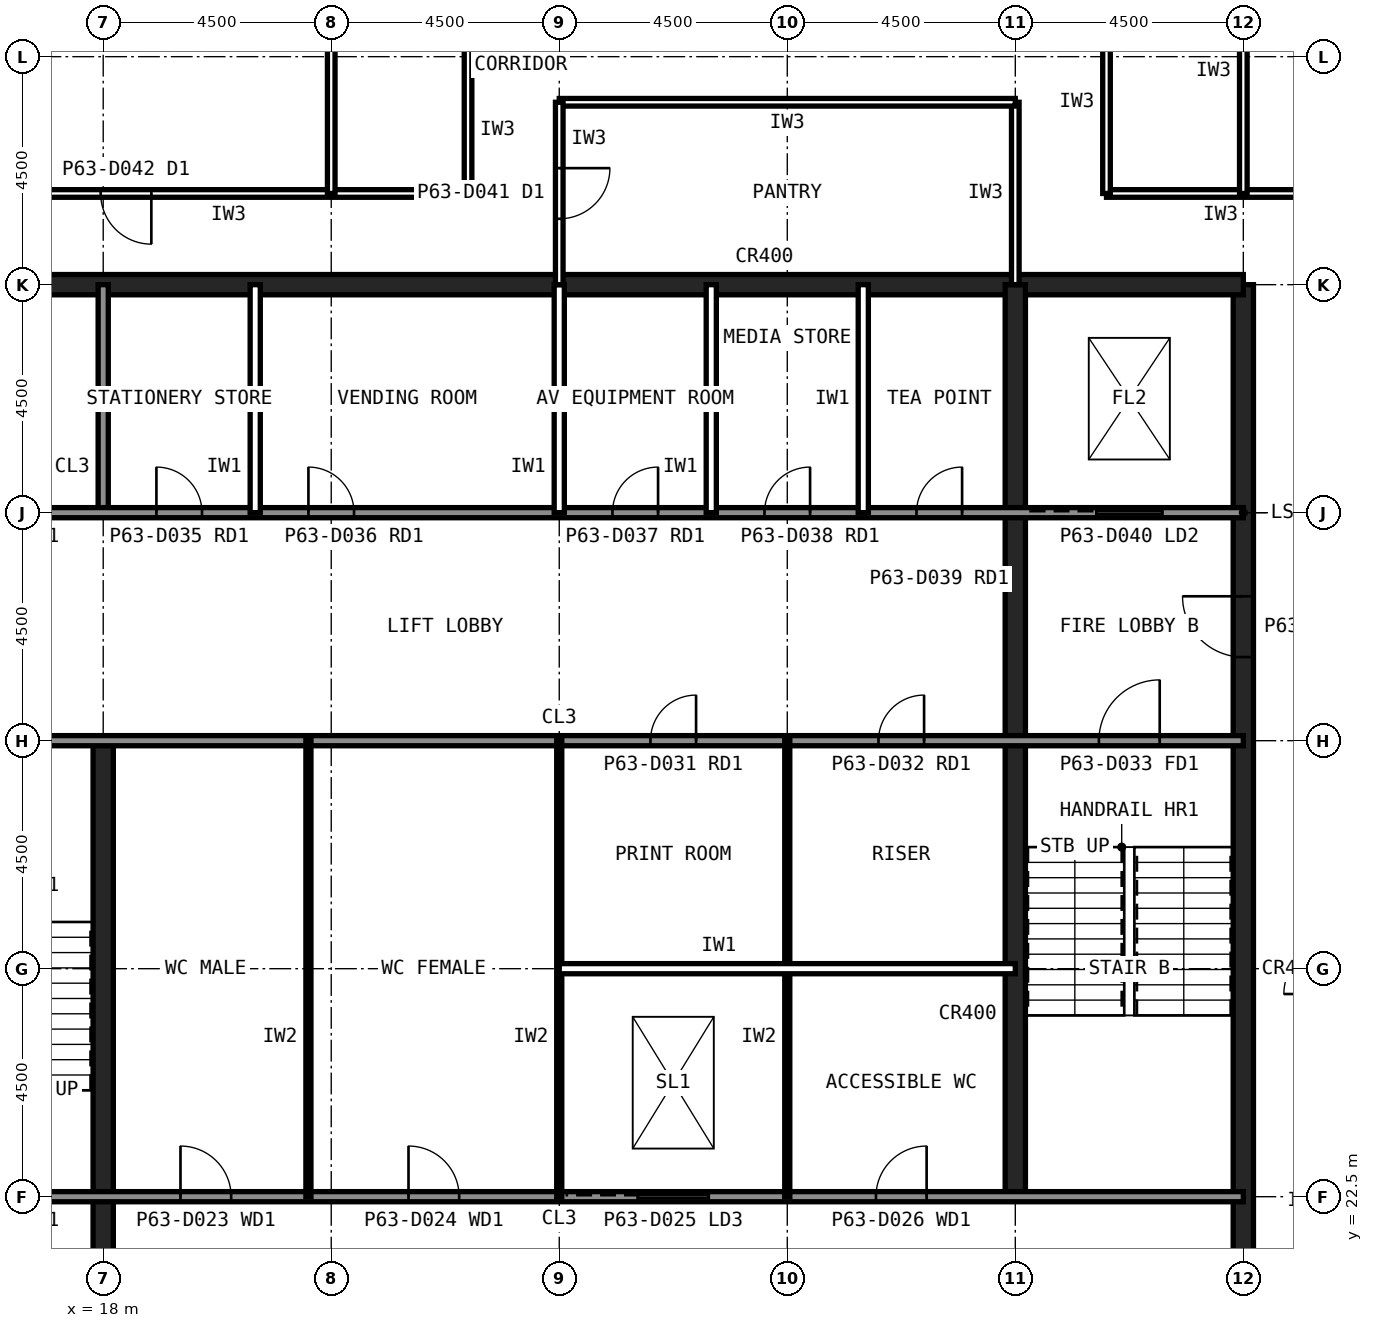
"""IFC4 building model, lengths in metres.
Left out: names, types, materials, properties, quantities, classifications, styles, units other than length and angle.
Written with IfcOpenShell. Run it as: python <this file> out.ifc"""

import sys

from ifc_helpers import new_model, si_unit, direction, frame, frame_2d, origin, place, context, subcontext, project, spatial, rectangle, extrude, element, fill, save


model = new_model("IFC4")
c1 = context("Model", 3, precision=1e-05, world=origin(), true_north=direction((0.0, 1.0)))
c2 = subcontext(c1, "Body", "Model", "MODEL_VIEW")
j1 = project(units=[si_unit("LENGTHUNIT", "METRE"), si_unit("PLANEANGLEUNIT", "RADIAN")], contexts=[c1])
p1 = place(None, origin())
s1 = spatial("IfcSite", under=j1, at=p1, CompositionType="ELEMENT")
p2 = place(p1, origin())
s2 = spatial("IfcBuilding", under=s1, at=p2, CompositionType="ELEMENT")
p3 = place(p2, frame((0.0, 0.0, 262.6)))
s3 = spatial("IfcBuildingStorey", under=s2, at=p3, CompositionType="ELEMENT", Elevation=262.6)
p4 = place(p3, frame((40.5, 13.5, 0.0), z_axis=(0.0, 0.0, 1.0), x_axis=(0.0, 1.0, 0.0)))
e1 = element("IfcWall", 1, at=p4, inside=s3, PredefinedType="SHEAR", context=c2, shape_type="SweptSolid", body=[
    extrude(rectangle(XDim=27.0, YDim=0.4, at=frame_2d((13.5, 0.0))), origin(), (0.0, 0.0, 1.0), 4.0),
])
p5 = place(p4, frame((5.85, 0.0, 0.0)))
e2 = element("IfcOpeningElement", 2, at=p5, cuts=e1, PredefinedType="OPENING", context=c2, shape_type="SweptSolid", body=[
    extrude(rectangle(XDim=1.8, YDim=2.1, at=frame_2d((0.9, 1.05))), frame((0.0, 0.21, 0.0), z_axis=(0.0, -1.0, 0.0), x_axis=(1.0, 0.0, 0.0)), (0.0, 0.0, 1.0), 0.42),
])
p6 = place(p4, frame((19.65, 0.0, 0.0)))
e3 = element("IfcOpeningElement", 3, at=p6, cuts=e1, PredefinedType="OPENING", context=c2, shape_type="SweptSolid", body=[
    extrude(rectangle(XDim=1.2, YDim=2.1, at=frame_2d((0.6, 1.05))), frame((0.0, 0.21, 0.0), z_axis=(0.0, -1.0, 0.0), x_axis=(1.0, 0.0, 0.0)), (0.0, 0.0, 1.0), 0.42),
])
p7 = place(p3, frame((40.5, 40.5, 0.0), z_axis=(0.0, 0.0, 1.0), x_axis=(-1.0, 0.0, 0.0)))
e4 = element("IfcWall", 4, at=p7, inside=s3, PredefinedType="SHEAR", context=c2, shape_type="SweptSolid", body=[
    extrude(rectangle(XDim=27.0, YDim=0.4, at=frame_2d((13.5, 0.0))), origin(), (0.0, 0.0, 1.0), 4.0),
])
p8 = place(p3, frame((18.0, 13.5, 0.0), z_axis=(0.0, 0.0, 1.0), x_axis=(0.0, 1.0, 0.0)))
e5 = element("IfcWall", 5, at=p8, inside=s3, PredefinedType="SHEAR", context=c2, shape_type="SweptSolid", body=[
    extrude(rectangle(XDim=18.0, YDim=0.4, at=frame_2d((9.0, 0.0))), origin(), (0.0, 0.0, 1.0), 4.0),
])
p9 = place(p3, frame((18.0, 36.0, 0.0), z_axis=(0.0, 0.0, 1.0), x_axis=(0.0, 1.0, 0.0)))
e6 = element("IfcWall", 6, at=p9, inside=s3, PredefinedType="SOLIDWALL", context=c2, shape_type="SweptSolid", body=[
    extrude(rectangle(XDim=4.5, YDim=0.2, at=frame_2d((2.25, 0.0))), origin(), (0.0, 0.0, 1.0), 3.84),
])
p10 = place(p3, frame((36.0, 22.5, 0.0), z_axis=(0.0, 0.0, 1.0), x_axis=(0.0, 1.0, 0.0)))
e7 = element("IfcWall", 7, at=p10, inside=s3, PredefinedType="SHEAR", context=c2, shape_type="SweptSolid", body=[
    extrude(rectangle(XDim=18.0, YDim=0.4, at=frame_2d((9.0, 0.0))), origin(), (0.0, 0.0, 1.0), 4.0),
])
p11 = place(p3, frame((13.5, 36.0, 0.0), z_axis=(0.0, 0.0, 1.0), x_axis=(1.0, 0.0, 0.0)))
e8 = element("IfcWall", 8, at=p11, inside=s3, PredefinedType="SOLIDWALL", context=c2, shape_type="SweptSolid", body=[
    extrude(rectangle(XDim=27.0, YDim=0.2, at=frame_2d((13.5, 0.0))), origin(), (0.0, 0.0, 1.0), 3.84),
])
p12 = place(p11, frame((1.8, 0.0, 0.0)))
e9 = element("IfcOpeningElement", 9, at=p12, cuts=e8, PredefinedType="OPENING", context=c2, shape_type="SweptSolid", body=[
    extrude(rectangle(XDim=0.9, YDim=2.1, at=frame_2d((0.45, 1.05))), frame((0.0, 0.11, 0.0), z_axis=(0.0, -1.0, 0.0), x_axis=(1.0, 0.0, 0.0)), (0.0, 0.0, 1.0), 0.22),
])
p13 = place(p11, frame((5.55, 0.0, 0.0)))
e10 = element("IfcOpeningElement", 10, at=p13, cuts=e8, PredefinedType="OPENING", context=c2, shape_type="SweptSolid", body=[
    extrude(rectangle(XDim=0.9, YDim=2.1, at=frame_2d((0.45, 1.05))), frame((0.0, 0.11, 0.0), z_axis=(0.0, -1.0, 0.0), x_axis=(1.0, 0.0, 0.0)), (0.0, 0.0, 1.0), 0.22),
])
p14 = place(p11, frame((11.55, 0.0, 0.0)))
e11 = element("IfcOpeningElement", 11, at=p14, cuts=e8, PredefinedType="OPENING", context=c2, shape_type="SweptSolid", body=[
    extrude(rectangle(XDim=0.9, YDim=2.1, at=frame_2d((0.45, 1.05))), frame((0.0, 0.11, 0.0), z_axis=(0.0, -1.0, 0.0), x_axis=(1.0, 0.0, 0.0)), (0.0, 0.0, 1.0), 0.22),
])
p15 = place(p11, frame((14.55, 0.0, 0.0)))
e12 = element("IfcOpeningElement", 12, at=p15, cuts=e8, PredefinedType="OPENING", context=c2, shape_type="SweptSolid", body=[
    extrude(rectangle(XDim=0.9, YDim=2.1, at=frame_2d((0.45, 1.05))), frame((0.0, 0.11, 0.0), z_axis=(0.0, -1.0, 0.0), x_axis=(1.0, 0.0, 0.0)), (0.0, 0.0, 1.0), 0.22),
])
p16 = place(p11, frame((24.1, 0.0, 0.0)))
e13 = element("IfcOpeningElement", 13, at=p16, cuts=e8, PredefinedType="OPENING", context=c2, shape_type="SweptSolid", body=[
    extrude(rectangle(XDim=1.3, YDim=2.2, at=frame_2d((0.65, 1.1))), frame((0.0, 0.11, 0.0), z_axis=(0.0, -1.0, 0.0), x_axis=(1.0, 0.0, 0.0)), (0.0, 0.0, 1.0), 0.22),
])
p17 = place(p3, frame((13.5, 22.5, 0.0), z_axis=(0.0, 0.0, 1.0), x_axis=(1.0, 0.0, 0.0)))
e14 = element("IfcWall", 14, at=p17, inside=s3, PredefinedType="SOLIDWALL", context=c2, shape_type="SweptSolid", body=[
    extrude(rectangle(XDim=27.0, YDim=0.2, at=frame_2d((13.5, 0.0))), origin(), (0.0, 0.0, 1.0), 3.84),
])
p18 = place(p17, frame((1.65, 0.0, 0.0)))
e15 = element("IfcOpeningElement", 15, at=p18, cuts=e14, PredefinedType="OPENING", context=c2, shape_type="SweptSolid", body=[
    extrude(rectangle(XDim=1.2, YDim=2.1, at=frame_2d((0.6, 1.05))), frame((0.0, 0.11, 0.0), z_axis=(0.0, -1.0, 0.0), x_axis=(1.0, 0.0, 0.0)), (0.0, 0.0, 1.0), 0.22),
])
p19 = place(p17, frame((6.025, 0.0, 0.0)))
e16 = element("IfcOpeningElement", 16, at=p19, cuts=e14, PredefinedType="OPENING", context=c2, shape_type="SweptSolid", body=[
    extrude(rectangle(XDim=1.0, YDim=2.1, at=frame_2d((0.5, 1.05))), frame((0.0, 0.11, 0.0), z_axis=(0.0, -1.0, 0.0), x_axis=(1.0, 0.0, 0.0)), (0.0, 0.0, 1.0), 0.22),
])
p20 = place(p17, frame((10.525, 0.0, 0.0)))
e17 = element("IfcOpeningElement", 17, at=p20, cuts=e14, PredefinedType="OPENING", context=c2, shape_type="SweptSolid", body=[
    extrude(rectangle(XDim=1.0, YDim=2.1, at=frame_2d((0.5, 1.05))), frame((0.0, 0.11, 0.0), z_axis=(0.0, -1.0, 0.0), x_axis=(1.0, 0.0, 0.0)), (0.0, 0.0, 1.0), 0.22),
])
p21 = place(p17, frame((19.75, 0.0, 0.0)))
e18 = element("IfcOpeningElement", 18, at=p21, cuts=e14, PredefinedType="OPENING", context=c2, shape_type="SweptSolid", body=[
    extrude(rectangle(XDim=1.0, YDim=2.1, at=frame_2d((0.5, 1.05))), frame((0.0, 0.11, 0.0), z_axis=(0.0, -1.0, 0.0), x_axis=(1.0, 0.0, 0.0)), (0.0, 0.0, 1.0), 0.22),
])
p22 = place(p17, frame((15.05, 0.0, 0.0)))
e19 = element("IfcOpeningElement", 19, at=p22, cuts=e14, PredefinedType="OPENING", context=c2, shape_type="SweptSolid", body=[
    extrude(rectangle(XDim=1.4, YDim=2.4, at=frame_2d((0.7, 1.2))), frame((0.0, 0.11, 0.0), z_axis=(0.0, -1.0, 0.0), x_axis=(1.0, 0.0, 0.0)), (0.0, 0.0, 1.0), 0.22),
])
p23 = place(p3, frame((13.5, 31.5, 0.0), z_axis=(0.0, 0.0, 1.0), x_axis=(1.0, 0.0, 0.0)))
e20 = element("IfcWall", 20, at=p23, inside=s3, PredefinedType="SOLIDWALL", context=c2, shape_type="SweptSolid", body=[
    extrude(rectangle(XDim=27.0, YDim=0.2, at=frame_2d((13.5, 0.0))), origin(), (0.0, 0.0, 1.0), 3.84),
])
p24 = place(p23, frame((24.15, 0.0, 0.0)))
e21 = element("IfcOpeningElement", 21, at=p24, cuts=e20, PredefinedType="OPENING", context=c2, shape_type="SweptSolid", body=[
    extrude(rectangle(XDim=1.2, YDim=2.1, at=frame_2d((0.6, 1.05))), frame((0.0, 0.11, 0.0), z_axis=(0.0, -1.0, 0.0), x_axis=(1.0, 0.0, 0.0)), (0.0, 0.0, 1.0), 0.22),
])
p25 = place(p23, frame((15.3, 0.0, 0.0)))
e22 = element("IfcOpeningElement", 22, at=p25, cuts=e20, PredefinedType="OPENING", context=c2, shape_type="SweptSolid", body=[
    extrude(rectangle(XDim=0.9, YDim=2.1, at=frame_2d((0.45, 1.05))), frame((0.0, 0.11, 0.0), z_axis=(0.0, -1.0, 0.0), x_axis=(1.0, 0.0, 0.0)), (0.0, 0.0, 1.0), 0.22),
])
p26 = place(p23, frame((19.8, 0.0, 0.0)))
e23 = element("IfcOpeningElement", 23, at=p26, cuts=e20, PredefinedType="OPENING", context=c2, shape_type="SweptSolid", body=[
    extrude(rectangle(XDim=0.9, YDim=2.1, at=frame_2d((0.45, 1.05))), frame((0.0, 0.11, 0.0), z_axis=(0.0, -1.0, 0.0), x_axis=(1.0, 0.0, 0.0)), (0.0, 0.0, 1.0), 0.22),
])
for number, where, z_axis, x_axis in (
    (24, (24.0, 36.0, 0.0), (0.0, 0.0, 1.0), (0.0, 1.0, 0.0)),
    (25, (27.0, 36.0, 0.0), (0.0, 0.0, 1.0), (0.0, 1.0, 0.0)),
):
    element("IfcWall", number, at=place(p3, frame(where, z_axis=z_axis, x_axis=x_axis)), inside=s3, PredefinedType="PARTITIONING", context=c2, shape_type="SweptSolid", body=[
        extrude(rectangle(XDim=4.5, YDim=0.2, at=frame_2d((2.25, 0.0))), origin(), (0.0, 0.0, 1.0), 3.84),
    ])
for number, where, z_axis, x_axis in (
    (26, (22.05, 22.5, 0.0), (0.0, 0.0, 1.0), (0.0, 1.0, 0.0)),
    (27, (27.0, 22.5, 0.0), (0.0, 0.0, 1.0), (0.0, 1.0, 0.0)),
    (28, (31.5, 22.5, 0.0), (0.0, 0.0, 1.0), (0.0, 1.0, 0.0)),
):
    element("IfcWall", number, at=place(p3, frame(where, z_axis=z_axis, x_axis=x_axis)), inside=s3, PredefinedType="PLUMBINGWALL", context=c2, shape_type="SweptSolid", body=[
        extrude(rectangle(XDim=9.0, YDim=0.1, at=frame_2d((4.5, 0.0))), origin(), (0.0, 0.0, 1.0), 3.84),
    ])
p27 = place(p3, frame((27.0, 27.0, 0.0), z_axis=(0.0, 0.0, 1.0), x_axis=(1.0, 0.0, 0.0)))
e29 = element("IfcWall", 29, at=p27, inside=s3, PredefinedType="PARTITIONING", context=c2, shape_type="SweptSolid", body=[
    extrude(rectangle(XDim=9.0, YDim=0.2, at=frame_2d((4.5, 0.0))), origin(), (0.0, 0.0, 1.0), 3.84),
])
p28 = place(p3, frame((25.2, 42.3, 0.0), z_axis=(0.0, 0.0, 1.0), x_axis=(-1.0, 0.0, 0.0)))
e30 = element("IfcWall", 30, at=p28, inside=s3, PredefinedType="PARTITIONING", context=c2, shape_type="SweptSolid", body=[
    extrude(rectangle(XDim=13.5, YDim=0.15, at=frame_2d((6.75, 0.0))), origin(), (0.0, 0.0, 1.0), 3.84),
])
p29 = place(p28, frame((6.25, 0.0, 0.0)))
e31 = element("IfcOpeningElement", 31, at=p29, cuts=e30, PredefinedType="OPENING", context=c2, shape_type="SweptSolid", body=[
    extrude(rectangle(XDim=1.0, YDim=2.1, at=frame_2d((0.5, 1.05))), frame((0.0, 0.085, 0.0), z_axis=(0.0, -1.0, 0.0), x_axis=(1.0, 0.0, 0.0)), (0.0, 0.0, 1.0), 0.17),
])
p30 = place(p3, frame((42.3, 42.3, 0.0), z_axis=(0.0, 0.0, 1.0), x_axis=(-1.0, 0.0, 0.0)))
e32 = element("IfcWall", 32, at=p30, inside=s3, PredefinedType="PARTITIONING", context=c2, shape_type="SweptSolid", body=[
    extrude(rectangle(XDim=4.5, YDim=0.15, at=frame_2d((2.25, 0.0))), origin(), (0.0, 0.0, 1.0), 3.84),
])
for number, where, z_axis, x_axis in (
    (33, (25.2, 45.9, 0.0), (0.0, 0.0, 1.0), (0.0, -1.0, 0.0)),
    (34, (37.8, 42.3, 0.0), (0.0, 0.0, 1.0), (0.0, 1.0, 0.0)),
):
    element("IfcWall", number, at=place(p3, frame(where, z_axis=z_axis, x_axis=x_axis)), inside=s3, PredefinedType="PARTITIONING", context=c2, shape_type="SweptSolid", body=[
        extrude(rectangle(XDim=3.6, YDim=0.15, at=frame_2d((1.8, 0.0))), origin(), (0.0, 0.0, 1.0), 3.84),
    ])
p31 = place(p3, frame((36.0, 40.5, 0.0), z_axis=(0.0, 0.0, 1.0), x_axis=(0.0, 1.0, 0.0)))
e35 = element("IfcWall", 35, at=p31, inside=s3, PredefinedType="PARTITIONING", context=c2, shape_type="SweptSolid", body=[
    extrude(rectangle(XDim=3.6, YDim=0.15, at=frame_2d((1.8, 0.0))), origin(), (0.0, 0.0, 1.0), 2.989),
])
p32 = place(p3, frame((36.0, 44.1, 0.0), z_axis=(0.0, 0.0, 1.0), x_axis=(-1.0, 0.0, 0.0)))
e36 = element("IfcWall", 36, at=p32, inside=s3, PredefinedType="PARTITIONING", context=c2, shape_type="SweptSolid", body=[
    extrude(rectangle(XDim=9.0, YDim=0.15, at=frame_2d((4.5, 0.0))), origin(), (0.0, 0.0, 1.0), 3.84),
])
p33 = place(p3, frame((27.0, 44.1, 0.0), z_axis=(0.0, 0.0, 1.0), x_axis=(0.0, -1.0, 0.0)))
e37 = element("IfcWall", 37, at=p33, inside=s3, PredefinedType="PARTITIONING", context=c2, shape_type="SweptSolid", body=[
    extrude(rectangle(XDim=3.6, YDim=0.15, at=frame_2d((1.8, 0.0))), origin(), (0.0, 0.0, 1.0), 2.989),
])
p34 = place(p33, frame((1.3, 0.0, 0.0)))
e38 = element("IfcOpeningElement", 38, at=p34, cuts=e37, PredefinedType="OPENING", context=c2, shape_type="SweptSolid", body=[
    extrude(rectangle(XDim=1.0, YDim=2.1, at=frame_2d((0.5, 1.05))), frame((0.0, 0.085, 0.0), z_axis=(0.0, -1.0, 0.0), x_axis=(1.0, 0.0, 0.0)), (0.0, 0.0, 1.0), 0.17),
])
p35 = place(p3, frame((22.5, 49.5, 0.0), z_axis=(0.0, 0.0, 1.0), x_axis=(0.0, -1.0, 0.0)))
e39 = element("IfcWall", 39, at=p35, inside=s3, PredefinedType="PARTITIONING", context=c2, shape_type="SweptSolid", body=[
    extrude(rectangle(XDim=7.2, YDim=0.15, at=frame_2d((3.6, 0.0))), origin(), (0.0, 0.0, 1.0), 2.989),
])
p36 = place(p35, frame((3.1, 0.0, 0.0)))
e40 = element("IfcOpeningElement", 40, at=p36, cuts=e39, PredefinedType="OPENING", context=c2, shape_type="SweptSolid", body=[
    extrude(rectangle(XDim=1.0, YDim=2.1, at=frame_2d((0.5, 1.05))), frame((0.0, 0.085, 0.0), z_axis=(0.0, -1.0, 0.0), x_axis=(1.0, 0.0, 0.0)), (0.0, 0.0, 1.0), 0.17),
])
p37 = place(p3, frame((40.5, 42.3, 0.0), z_axis=(0.0, 0.0, 1.0), x_axis=(0.0, 1.0, 0.0)))
e41 = element("IfcWall", 41, at=p37, inside=s3, PredefinedType="PARTITIONING", context=c2, shape_type="SweptSolid", body=[
    extrude(rectangle(XDim=6.88, YDim=0.15, at=frame_2d((3.44, 0.0))), origin(), (0.0, 0.0, 1.0), 2.989),
])
p38 = place(p37, frame((2.94, 0.0, 0.0)))
e42 = element("IfcOpeningElement", 42, at=p38, cuts=e41, PredefinedType="OPENING", context=c2, shape_type="SweptSolid", body=[
    extrude(rectangle(XDim=1.0, YDim=2.1, at=frame_2d((0.5, 1.05))), frame((0.0, 0.085, 0.0), z_axis=(0.0, -1.0, 0.0), x_axis=(1.0, 0.0, 0.0)), (0.0, 0.0, 1.0), 0.17),
])
p39 = place(p6, origin())
e43 = element("IfcDoor", 43, at=p39, inside=s3, OperationType="SINGLE_SWING_RIGHT", PredefinedType="DOOR", context=c2, shape_type="SweptSolid", body=[
    extrude(rectangle(XDim=1.2, YDim=2.1, at=frame_2d((0.6, 1.05))), frame((0.0, 0.025, 0.0), z_axis=(0.0, -1.0, 0.0), x_axis=(1.0, 0.0, 0.0)), (0.0, 0.0, 1.0), 0.05),
])
fill(e3, e43)
p40 = place(p24, origin())
e44 = element("IfcDoor", 44, at=p40, inside=s3, OperationType="SINGLE_SWING_RIGHT", PredefinedType="DOOR", context=c2, shape_type="SweptSolid", body=[
    extrude(rectangle(XDim=1.2, YDim=2.1, at=frame_2d((0.6, 1.05))), frame((0.0, 0.025, 0.0), z_axis=(0.0, -1.0, 0.0), x_axis=(1.0, 0.0, 0.0)), (0.0, 0.0, 1.0), 0.05),
])
fill(e21, e44)
p41 = place(p19, origin())
e45 = element("IfcDoor", 45, at=p41, inside=s3, OperationType="SINGLE_SWING_LEFT", PredefinedType="DOOR", context=c2, shape_type="SweptSolid", body=[
    extrude(rectangle(XDim=1.0, YDim=2.1, at=frame_2d((0.5, 1.05))), frame((0.0, 0.025, 0.0), z_axis=(0.0, -1.0, 0.0), x_axis=(1.0, 0.0, 0.0)), (0.0, 0.0, 1.0), 0.05),
])
fill(e16, e45)
p42 = place(p20, origin())
e46 = element("IfcDoor", 46, at=p42, inside=s3, OperationType="SINGLE_SWING_LEFT", PredefinedType="DOOR", context=c2, shape_type="SweptSolid", body=[
    extrude(rectangle(XDim=1.0, YDim=2.1, at=frame_2d((0.5, 1.05))), frame((0.0, 0.025, 0.0), z_axis=(0.0, -1.0, 0.0), x_axis=(1.0, 0.0, 0.0)), (0.0, 0.0, 1.0), 0.05),
])
fill(e17, e46)
p43 = place(p21, origin())
e47 = element("IfcDoor", 47, at=p43, inside=s3, OperationType="SINGLE_SWING_RIGHT", PredefinedType="DOOR", context=c2, shape_type="SweptSolid", body=[
    extrude(rectangle(XDim=1.0, YDim=2.1, at=frame_2d((0.5, 1.05))), frame((0.0, 0.025, 0.0), z_axis=(0.0, -1.0, 0.0), x_axis=(1.0, 0.0, 0.0)), (0.0, 0.0, 1.0), 0.05),
])
fill(e18, e47)
p44 = place(p25, origin())
e48 = element("IfcDoor", 48, at=p44, inside=s3, OperationType="SINGLE_SWING_RIGHT", PredefinedType="DOOR", context=c2, shape_type="SweptSolid", body=[
    extrude(rectangle(XDim=0.9, YDim=2.1, at=frame_2d((0.45, 1.05))), frame((0.0, 0.025, 0.0), z_axis=(0.0, -1.0, 0.0), x_axis=(1.0, 0.0, 0.0)), (0.0, 0.0, 1.0), 0.05),
])
fill(e22, e48)
p45 = place(p26, origin())
e49 = element("IfcDoor", 49, at=p45, inside=s3, OperationType="SINGLE_SWING_RIGHT", PredefinedType="DOOR", context=c2, shape_type="SweptSolid", body=[
    extrude(rectangle(XDim=0.9, YDim=2.1, at=frame_2d((0.45, 1.05))), frame((0.0, 0.025, 0.0), z_axis=(0.0, -1.0, 0.0), x_axis=(1.0, 0.0, 0.0)), (0.0, 0.0, 1.0), 0.05),
])
fill(e23, e49)
p46 = place(p13, origin())
e50 = element("IfcDoor", 50, at=p46, inside=s3, OperationType="SINGLE_SWING_LEFT", PredefinedType="DOOR", context=c2, shape_type="SweptSolid", body=[
    extrude(rectangle(XDim=0.9, YDim=2.1, at=frame_2d((0.45, 1.05))), frame((0.0, 0.025, 0.0), z_axis=(0.0, -1.0, 0.0), x_axis=(1.0, 0.0, 0.0)), (0.0, 0.0, 1.0), 0.05),
])
fill(e10, e50)
p47 = place(p14, origin())
e51 = element("IfcDoor", 51, at=p47, inside=s3, OperationType="SINGLE_SWING_LEFT", PredefinedType="DOOR", context=c2, shape_type="SweptSolid", body=[
    extrude(rectangle(XDim=0.9, YDim=2.1, at=frame_2d((0.45, 1.05))), frame((0.0, 0.025, 0.0), z_axis=(0.0, -1.0, 0.0), x_axis=(1.0, 0.0, 0.0)), (0.0, 0.0, 1.0), 0.05),
])
fill(e11, e51)
p48 = place(p15, origin())
e52 = element("IfcDoor", 52, at=p48, inside=s3, OperationType="SINGLE_SWING_RIGHT", PredefinedType="DOOR", context=c2, shape_type="SweptSolid", body=[
    extrude(rectangle(XDim=0.9, YDim=2.1, at=frame_2d((0.45, 1.05))), frame((0.0, 0.025, 0.0), z_axis=(0.0, -1.0, 0.0), x_axis=(1.0, 0.0, 0.0)), (0.0, 0.0, 1.0), 0.05),
])
fill(e12, e52)
p49 = place(p16, origin())
e53 = element("IfcDoor", 53, at=p49, inside=s3, OperationType="SLIDING_TO_LEFT", PredefinedType="DOOR", context=c2, shape_type="SweptSolid", body=[
    extrude(rectangle(XDim=1.3, YDim=2.2, at=frame_2d((0.65, 1.1))), frame((0.0, 0.025, 0.0), z_axis=(0.0, -1.0, 0.0), x_axis=(1.0, 0.0, 0.0)), (0.0, 0.0, 1.0), 0.05),
])
fill(e13, e53)
p50 = place(p22, origin())
e54 = element("IfcDoor", 54, at=p50, inside=s3, OperationType="SLIDING_TO_LEFT", PredefinedType="DOOR", context=c2, shape_type="SweptSolid", body=[
    extrude(rectangle(XDim=1.4, YDim=2.4, at=frame_2d((0.7, 1.2))), frame((0.0, 0.025, 0.0), z_axis=(0.0, -1.0, 0.0), x_axis=(1.0, 0.0, 0.0)), (0.0, 0.0, 1.0), 0.05),
])
fill(e19, e54)
p51 = place(p29, origin())
e55 = element("IfcDoor", 55, at=p51, inside=s3, OperationType="SINGLE_SWING_LEFT", PredefinedType="DOOR", context=c2, shape_type="SweptSolid", body=[
    extrude(rectangle(XDim=1.0, YDim=2.1, at=frame_2d((0.5, 1.05))), frame((0.0, 0.025, 0.0), z_axis=(0.0, -1.0, 0.0), x_axis=(1.0, 0.0, 0.0)), (0.0, 0.0, 1.0), 0.05),
])
fill(e31, e55)
p52 = place(p34, origin())
e56 = element("IfcDoor", 56, at=p52, inside=s3, OperationType="SINGLE_SWING_LEFT", PredefinedType="DOOR", context=c2, shape_type="SweptSolid", body=[
    extrude(rectangle(XDim=1.0, YDim=2.1, at=frame_2d((0.5, 1.05))), frame((0.0, 0.025, 0.0), z_axis=(0.0, -1.0, 0.0), x_axis=(1.0, 0.0, 0.0)), (0.0, 0.0, 1.0), 0.05),
])
fill(e38, e56)
save(model, sys.argv[1])
